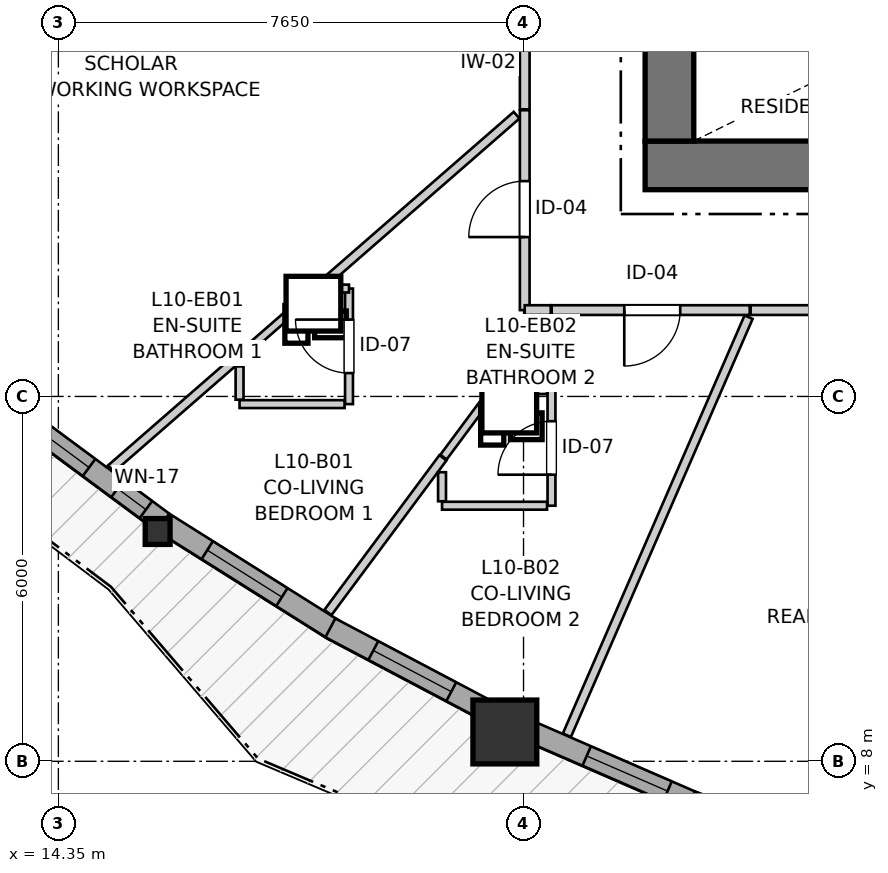
"""IFC4 building model, lengths in metres.
Left out: names, types, materials, properties, quantities, classifications, styles, units other than length and angle.
Written with IfcOpenShell. Run it as: python <this file> out.ifc"""

import sys

from ifc_helpers import new_model, si_unit, direction, frame, frame_2d, origin, origin_2d, place, context, subcontext, project, spatial, rectangle, i_section, extrude, source, transform, mapped, element, fill, save


model = new_model("IFC4")
c1 = context("Model", 3, precision=1e-05, world=origin(), true_north=direction((0.0, 1.0)))
c2 = subcontext(c1, "Body", "Model", "MODEL_VIEW")
j1 = project(units=[si_unit("LENGTHUNIT", "METRE"), si_unit("PLANEANGLEUNIT", "RADIAN")], contexts=[c1])
p1 = place(None, origin())
s1 = spatial("IfcSite", under=j1, at=p1, CompositionType="ELEMENT")
p2 = place(p1, origin())
s2 = spatial("IfcBuilding", under=s1, at=p2, CompositionType="ELEMENT")
p3 = place(p2, frame((0.0, 0.0, 36.6)))
s3 = spatial("IfcBuildingStorey", under=s2, at=p3, CompositionType="ELEMENT", Elevation=36.6)
p4 = place(p3, frame((24.0, 17.8, 0.0), z_axis=(0.0, 0.0, 1.0), x_axis=(1.0, 0.0, 0.0)))
e1 = element("IfcWall", 1, at=p4, inside=s3, PredefinedType="SHEAR", context=c2, shape_type="SweptSolid", body=[
    extrude(rectangle(XDim=12.7, YDim=0.8, at=frame_2d((6.35, 0.0))), origin(), (0.0, 0.0, 1.0), 2.94),
])
p5 = place(p3, frame((24.4, 33.8, 0.0), z_axis=(0.0, 0.0, 1.0), x_axis=(0.0, -1.0, 0.0)))
e2 = element("IfcWall", 2, at=p5, inside=s3, PredefinedType="SHEAR", context=c2, shape_type="SweptSolid", body=[
    extrude(rectangle(XDim=15.6, YDim=0.8, at=frame_2d((7.8, 0.0))), origin(), (0.0, 0.0, 1.0), 2.94),
])
p6 = place(p5, frame((7.05, 0.0, 0.0)))
e3 = element("IfcOpeningElement", 3, at=p6, cuts=e2, PredefinedType="OPENING", context=c2, shape_type="SweptSolid", body=[
    extrude(rectangle(XDim=1.5, YDim=2.15, at=frame_2d((0.75, 1.075))), frame((0.0, 0.41, 0.0), z_axis=(0.0, -1.0, 0.0), x_axis=(1.0, 0.0, 0.0)), (0.0, 0.0, 1.0), 0.82),
])
p7 = place(p5, frame((3.52, 0.0, 0.0)))
e4 = element("IfcOpeningElement", 4, at=p7, cuts=e2, PredefinedType="OPENING", context=c2, shape_type="SweptSolid", body=[
    extrude(rectangle(XDim=0.86, YDim=2.05, at=frame_2d((0.43, 1.025))), frame((0.0, 0.41, 0.0), z_axis=(0.0, -1.0, 0.0), x_axis=(1.0, 0.0, 0.0)), (0.0, 0.0, 1.0), 0.82),
])
p8 = place(p5, frame((11.22, 0.0, 0.0)))
e5 = element("IfcOpeningElement", 5, at=p8, cuts=e2, PredefinedType="OPENING", context=c2, shape_type="SweptSolid", body=[
    extrude(rectangle(XDim=0.86, YDim=2.05, at=frame_2d((0.43, 1.025))), frame((0.0, 0.41, 0.0), z_axis=(0.0, -1.0, 0.0), x_axis=(1.0, 0.0, 0.0)), (0.0, 0.0, 1.0), 0.82),
])
m1 = source(origin(), c2, "Body", "SweptSolid", [
    extrude(i_section(OverallWidth=0.409, OverallDepth=0.425, WebThickness=0.03, FlangeThickness=0.048, FilletRadius=0.015, at=origin_2d()), origin(), (0.0, 0.0, 1.0), 2.94),
])
p9 = place(p3, frame((15.983, 11.779, 0.0), z_axis=(0.0, 0.0, 1.0), x_axis=(1.0, 0.0, 0.0)))
e6 = element("IfcColumn", 6, at=p9, inside=s3, PredefinedType="PILASTER", context=c2, shape_type="MappedRepresentation", body=[
    mapped(m1, transform((0.0, 0.0, 0.0), x_axis=(1.0, 0.0, 0.0), y_axis=(0.0, 1.0, 0.0), z_axis=(0.0, 0.0, 1.0), scale=1.0)),
])
m2 = source(origin(), c2, "Body", "SweptSolid", [
    extrude(rectangle(XDim=1.05, YDim=1.05, at=origin_2d()), origin(), (0.0, 0.0, 1.0), 2.94),
])
p10 = place(p3, frame((21.693, 8.482, 0.0), z_axis=(0.0, 0.0, 1.0), x_axis=(1.0, 0.0, 0.0)))
e7 = element("IfcColumn", 7, at=p10, inside=s3, PredefinedType="COLUMN", context=c2, shape_type="MappedRepresentation", body=[
    mapped(m2, transform((0.0, 0.0, 0.0), x_axis=(1.0, 0.0, 0.0), y_axis=(0.0, 1.0, 0.0), z_axis=(0.0, 0.0, 1.0), scale=1.0)),
])
p11 = place(p3, frame((13.389, 13.917, 0.0), z_axis=(0.0, 0.0, 1.0), x_axis=(0.803777512245, -0.594930004966, 0.0)))
e8 = element("IfcWall", 8, at=p11, inside=s3, PredefinedType="SOLIDWALL", context=c2, shape_type="SweptSolid", body=[
    extrude(rectangle(XDim=3.336, YDim=0.35, at=frame_2d((1.668, 0.0))), origin(), (0.0, 0.0, 1.0), 2.42),
])
p12 = place(p11, frame((0.374, 0.0, 0.82)))
e9 = element("IfcOpeningElement", 9, at=p12, cuts=e8, PredefinedType="OPENING", context=c2, shape_type="SweptSolid", body=[
    extrude(rectangle(XDim=1.45, YDim=1.25, at=frame_2d((0.725, 0.625))), frame((0.0, 0.185, 0.0), z_axis=(0.0, -1.0, 0.0), x_axis=(1.0, 0.0, 0.0)), (0.0, 0.0, 1.0), 0.37),
])
p13 = place(p11, frame((2.407, 0.0, 0.82)))
e10 = element("IfcOpeningElement", 10, at=p13, cuts=e8, PredefinedType="OPENING", context=c2, shape_type="SweptSolid", body=[
    extrude(rectangle(XDim=0.58, YDim=1.35, at=frame_2d((0.29, 0.675))), frame((0.0, 0.185, 0.0), z_axis=(0.0, -1.0, 0.0), x_axis=(1.0, 0.0, 0.0)), (0.0, 0.0, 1.0), 0.37),
])
p14 = place(p3, frame((16.093, 11.917, 0.0), z_axis=(0.0, 0.0, 1.0), x_axis=(0.846444167315, -0.532477484612, 0.0)))
e11 = element("IfcWall", 11, at=p14, inside=s3, PredefinedType="SOLIDWALL", context=c2, shape_type="SweptSolid", body=[
    extrude(rectangle(XDim=3.317, YDim=0.35, at=frame_2d((1.659, 0.0))), origin(), (0.0, 0.0, 1.0), 2.42),
])
p15 = place(p14, frame((0.834, 0.0, 0.82)))
e12 = element("IfcOpeningElement", 12, at=p15, cuts=e11, PredefinedType="OPENING", context=c2, shape_type="SweptSolid", body=[
    extrude(rectangle(XDim=1.45, YDim=1.25, at=frame_2d((0.725, 0.625))), frame((0.0, 0.185, 0.0), z_axis=(0.0, -1.0, 0.0), x_axis=(1.0, 0.0, 0.0)), (0.0, 0.0, 1.0), 0.37),
])
p16 = place(p3, frame((18.823, 10.195, 0.0), z_axis=(0.0, 0.0, 1.0), x_axis=(0.884422538795, -0.466687018108, 0.0)))
e13 = element("IfcWall", 13, at=p16, inside=s3, PredefinedType="SOLIDWALL", context=c2, shape_type="SweptSolid", body=[
    extrude(rectangle(XDim=3.037, YDim=0.35, at=frame_2d((1.519, 0.0))), origin(), (0.0, 0.0, 1.0), 2.42),
])
p17 = place(p16, frame((0.799, 0.0, 0.82)))
e14 = element("IfcOpeningElement", 14, at=p17, cuts=e13, PredefinedType="OPENING", context=c2, shape_type="SweptSolid", body=[
    extrude(rectangle(XDim=1.45, YDim=1.25, at=frame_2d((0.725, 0.625))), frame((0.0, 0.185, 0.0), z_axis=(0.0, -1.0, 0.0), x_axis=(1.0, 0.0, 0.0)), (0.0, 0.0, 1.0), 0.37),
])
p18 = place(p3, frame((22.038, 8.523, 0.0), z_axis=(0.0, 0.0, 1.0), x_axis=(0.91704973522, -0.398772846535, 0.0)))
e15 = element("IfcWall", 15, at=p18, inside=s3, PredefinedType="SOLIDWALL", context=c2, shape_type="SweptSolid", body=[
    extrude(rectangle(XDim=3.056, YDim=0.35, at=frame_2d((1.528, 0.0))), origin(), (0.0, 0.0, 1.0), 2.42),
])
p19 = place(p18, frame((1.092, 0.0, 0.82)))
e16 = element("IfcOpeningElement", 16, at=p19, cuts=e15, PredefinedType="OPENING", context=c2, shape_type="SweptSolid", body=[
    extrude(rectangle(XDim=1.45, YDim=1.25, at=frame_2d((0.725, 0.625))), frame((0.0, 0.185, 0.0), z_axis=(0.0, -1.0, 0.0), x_axis=(1.0, 0.0, 0.0)), (0.0, 0.0, 1.0), 0.37),
])
p20 = place(p3, frame((24.758, 7.337, 0.0), z_axis=(0.0, 0.0, 1.0), x_axis=(0.944146789085, -0.329525174547, 0.0)))
e17 = element("IfcWall", 17, at=p20, inside=s3, PredefinedType="SOLIDWALL", context=c2, shape_type="SweptSolid", body=[
    extrude(rectangle(XDim=3.374, YDim=0.35, at=frame_2d((1.687, 0.0))), origin(), (0.0, 0.0, 1.0), 2.42),
])
p21 = place(p20, frame((0.647, 0.0, 0.82)))
e18 = element("IfcOpeningElement", 18, at=p21, cuts=e17, PredefinedType="OPENING", context=c2, shape_type="SweptSolid", body=[
    extrude(rectangle(XDim=2.1, YDim=1.4, at=frame_2d((1.05, 0.7))), frame((0.0, 0.185, 0.0), z_axis=(0.0, -1.0, 0.0), x_axis=(1.0, 0.0, 0.0)), (0.0, 0.0, 1.0), 0.37),
])
p22 = place(p3, frame((22.02, 18.722, 0.0), z_axis=(0.0, 0.0, 1.0), x_axis=(0.0, 1.0, 0.0)))
e19 = element("IfcWall", 19, at=p22, inside=s3, PredefinedType="PARTITIONING", context=c2, shape_type="SweptSolid", body=[
    extrude(rectangle(XDim=5.428, YDim=0.16, at=frame_2d((2.714, 0.0))), origin(), (0.0, 0.0, 1.0), 2.94),
])
p23 = place(p22, frame((1.996, 0.0, 0.0)))
e20 = element("IfcOpeningElement", 20, at=p23, cuts=e19, PredefinedType="OPENING", context=c2, shape_type="SweptSolid", body=[
    extrude(rectangle(XDim=0.96, YDim=2.1, at=frame_2d((0.48, 1.05))), frame((0.0, 0.09, 0.0), z_axis=(0.0, -1.0, 0.0), x_axis=(1.0, 0.0, 0.0)), (0.0, 0.0, 1.0), 0.18),
])
p24 = place(p3, frame((30.849, 15.42, 0.0), z_axis=(0.0, 0.0, 1.0), x_axis=(-1.0, 0.0, 0.0)))
e21 = element("IfcWall", 21, at=p24, inside=s3, PredefinedType="PARTITIONING", context=c2, shape_type="SweptSolid", body=[
    extrude(rectangle(XDim=5.114, YDim=0.16, at=frame_2d((2.557, 0.0))), origin(), (0.0, 0.0, 1.0), 2.94),
])
p25 = place(p24, frame((2.076, 0.0, 0.0)))
e22 = element("IfcOpeningElement", 22, at=p25, cuts=e21, PredefinedType="OPENING", context=c2, shape_type="SweptSolid", body=[
    extrude(rectangle(XDim=0.96, YDim=2.1, at=frame_2d((0.48, 1.05))), frame((0.0, 0.09, 0.0), z_axis=(0.0, -1.0, 0.0), x_axis=(1.0, 0.0, 0.0)), (0.0, 0.0, 1.0), 0.18),
])
p26 = place(p3, frame((22.02, 15.42, 0.0), z_axis=(0.0, 0.0, 1.0), x_axis=(0.0, 1.0, 0.0)))
e23 = element("IfcWall", 23, at=p26, inside=s3, PredefinedType="PARTITIONING", context=c2, shape_type="SweptSolid", body=[
    extrude(rectangle(XDim=3.287, YDim=0.16, at=frame_2d((1.644, 0.0))), origin(), (0.0, 0.0, 1.0), 2.94),
])
p27 = place(p26, frame((1.201, 0.0, 0.0)))
e24 = element("IfcOpeningElement", 24, at=p27, cuts=e23, PredefinedType="OPENING", context=c2, shape_type="SweptSolid", body=[
    extrude(rectangle(XDim=0.92, YDim=2.1, at=frame_2d((0.46, 1.05))), frame((0.0, 0.09, 0.0), z_axis=(0.0, -1.0, 0.0), x_axis=(1.0, 0.0, 0.0)), (0.0, 0.0, 1.0), 0.18),
])
p28 = place(p3, frame((25.72, 15.42, 0.0), z_axis=(0.0, 0.0, 1.0), x_axis=(-1.0, 0.0, 0.0)))
e25 = element("IfcWall", 25, at=p28, inside=s3, PredefinedType="PARTITIONING", context=c2, shape_type="SweptSolid", body=[
    extrude(rectangle(XDim=3.257, YDim=0.16, at=frame_2d((1.628, 0.0))), origin(), (0.0, 0.0, 1.0), 2.94),
])
p29 = place(p28, frame((1.143, 0.0, 0.0)))
e26 = element("IfcOpeningElement", 26, at=p29, cuts=e25, PredefinedType="OPENING", context=c2, shape_type="SweptSolid", body=[
    extrude(rectangle(XDim=0.92, YDim=2.1, at=frame_2d((0.46, 1.05))), frame((0.0, 0.09, 0.0), z_axis=(0.0, -1.0, 0.0), x_axis=(1.0, 0.0, 0.0)), (0.0, 0.0, 1.0), 0.18),
])
p30 = place(p3, frame((22.46, 12.203, 0.0), z_axis=(0.0, 0.0, 1.0), x_axis=(0.0, 1.0, 0.0)))
e27 = element("IfcWall", 27, at=p30, inside=s3, PredefinedType="PARTITIONING", context=c2, shape_type="SweptSolid", body=[
    extrude(rectangle(XDim=1.9, YDim=0.13, at=frame_2d((0.95, 0.0))), origin(), (0.0, 0.0, 1.0), 2.94),
])
p31 = place(p30, frame((0.51, 0.0, 0.0)))
e28 = element("IfcOpeningElement", 28, at=p31, cuts=e27, PredefinedType="OPENING", context=c2, shape_type="SweptSolid", body=[
    extrude(rectangle(XDim=0.88, YDim=2.05, at=frame_2d((0.44, 1.025))), frame((0.0, 0.075, 0.0), z_axis=(0.0, -1.0, 0.0), x_axis=(1.0, 0.0, 0.0)), (0.0, 0.0, 1.0), 0.15),
])
p32 = place(p3, frame((19.13, 13.874, 0.0), z_axis=(0.0, 0.0, 1.0), x_axis=(0.0, 1.0, 0.0)))
e29 = element("IfcWall", 29, at=p32, inside=s3, PredefinedType="PARTITIONING", context=c2, shape_type="SweptSolid", body=[
    extrude(rectangle(XDim=1.9, YDim=0.13, at=frame_2d((0.95, 0.0))), origin(), (0.0, 0.0, 1.0), 2.94),
])
p33 = place(p32, frame((0.51, 0.0, 0.0)))
e30 = element("IfcOpeningElement", 30, at=p33, cuts=e29, PredefinedType="OPENING", context=c2, shape_type="SweptSolid", body=[
    extrude(rectangle(XDim=0.88, YDim=2.05, at=frame_2d((0.44, 1.025))), frame((0.0, 0.075, 0.0), z_axis=(0.0, -1.0, 0.0), x_axis=(1.0, 0.0, 0.0)), (0.0, 0.0, 1.0), 0.15),
])
p34 = place(p3, frame((22.713, 8.429, 0.0), z_axis=(0.0, 0.0, 1.0), x_axis=(0.398615352261, 0.917118204454, 0.0)))
e31 = element("IfcWall", 31, at=p34, inside=s3, PredefinedType="PARTITIONING", context=c2, shape_type="SweptSolid", body=[
    extrude(rectangle(XDim=7.496, YDim=0.145, at=frame_2d((3.748, 0.0))), origin(), (0.0, 0.0, 1.0), 2.94),
])
p35 = place(p3, frame((18.614, 15.774, 0.0), z_axis=(0.0, 0.0, 1.0), x_axis=(0.753902736672, 0.656986045239, 0.0)))
e32 = element("IfcWall", 32, at=p35, inside=s3, PredefinedType="PARTITIONING", context=c2, shape_type="SweptSolid", body=[
    extrude(rectangle(XDim=4.34, YDim=0.145, at=frame_2d((2.17, 0.0))), origin(), (0.0, 0.0, 1.0), 2.94),
])
p36 = place(p3, frame((18.783, 10.447, 0.0), z_axis=(0.0, 0.0, 1.0), x_axis=(0.596791765516, 0.80239615441, 0.0)))
e33 = element("IfcWall", 33, at=p36, inside=s3, PredefinedType="PARTITIONING", context=c2, shape_type="SweptSolid", body=[
    extrude(rectangle(XDim=3.17, YDim=0.145, at=frame_2d((1.585, 0.0))), origin(), (0.0, 0.0, 1.0), 2.94),
])
p37 = place(p3, frame((15.215, 12.812, 0.0), z_axis=(0.0, 0.0, 1.0), x_axis=(0.753874404049, 0.657018555993, 0.0)))
e34 = element("IfcWall", 34, at=p37, inside=s3, PredefinedType="PARTITIONING", context=c2, shape_type="SweptSolid", body=[
    extrude(rectangle(XDim=2.805, YDim=0.145, at=frame_2d((1.403, 0.0))), origin(), (0.0, 0.0, 1.0), 2.94),
])
p38 = place(p3, frame((17.33, 13.874, 0.0), z_axis=(0.0, 0.0, 1.0), x_axis=(1.0, 0.0, 0.0)))
e35 = element("IfcWall", 35, at=p38, inside=s3, PredefinedType="PARTITIONING", context=c2, shape_type="SweptSolid", body=[
    extrude(rectangle(XDim=1.727, YDim=0.13, at=frame_2d((0.863, 0.0))), origin(), (0.0, 0.0, 1.0), 2.94),
])
p39 = place(p3, frame((20.66, 12.203, 0.0), z_axis=(0.0, 0.0, 1.0), x_axis=(1.0, 0.0, 0.0)))
e36 = element("IfcWall", 36, at=p39, inside=s3, PredefinedType="PARTITIONING", context=c2, shape_type="SweptSolid", body=[
    extrude(rectangle(XDim=1.727, YDim=0.13, at=frame_2d((0.864, 0.0))), origin(), (0.0, 0.0, 1.0), 2.94),
])
p40 = place(p3, frame((17.341, 14.665, 0.0), z_axis=(0.0, 0.0, 1.0), x_axis=(0.753885757535, 0.657005528581, 0.0)))
e37 = element("IfcWall", 37, at=p40, inside=s3, PredefinedType="PARTITIONING", context=c2, shape_type="SweptSolid", body=[
    extrude(rectangle(XDim=1.673, YDim=0.13, at=frame_2d((0.837, 0.0))), origin(), (0.0, 0.0, 1.0), 2.94),
])
p41 = place(p3, frame((21.491, 14.088, 0.0), z_axis=(0.0, 0.0, 1.0), x_axis=(0.596893728005, 0.802320308523, 0.0)))
e38 = element("IfcWall", 38, at=p41, inside=s3, PredefinedType="PARTITIONING", context=c2, shape_type="SweptSolid", body=[
    extrude(rectangle(XDim=1.499, YDim=0.145, at=frame_2d((0.749, 0.0))), origin(), (0.0, 0.0, 1.0), 2.94),
])
p42 = place(p3, frame((20.684, 13.003, 0.0), z_axis=(0.0, 0.0, 1.0), x_axis=(0.596518903615, 0.802599026681, 0.0)))
e39 = element("IfcWall", 39, at=p42, inside=s3, PredefinedType="PARTITIONING", context=c2, shape_type="SweptSolid", body=[
    extrude(rectangle(XDim=1.337, YDim=0.13, at=frame_2d((0.669, 0.0))), origin(), (0.0, 0.0, 1.0), 2.94),
])
p43 = place(p3, frame((21.649, 14.103, 0.0), z_axis=(0.0, 0.0, 1.0), x_axis=(1.0, 0.0, 0.0)))
e40 = element("IfcWall", 40, at=p43, inside=s3, PredefinedType="PARTITIONING", context=c2, shape_type="SweptSolid", body=[
    extrude(rectangle(XDim=0.738, YDim=0.13, at=frame_2d((0.369, 0.0))), origin(), (0.0, 0.0, 1.0), 2.94),
])
p44 = place(p3, frame((17.33, 13.947, 0.0), z_axis=(0.0, 0.0, 1.0), x_axis=(0.0, 1.0, 0.0)))
e41 = element("IfcWall", 41, at=p44, inside=s3, PredefinedType="PARTITIONING", context=c2, shape_type="SweptSolid", body=[
    extrude(rectangle(XDim=0.547, YDim=0.13, at=frame_2d((0.273, 0.0))), origin(), (0.0, 0.0, 1.0), 2.94),
])
p45 = place(p3, frame((20.66, 12.276, 0.0), z_axis=(0.0, 0.0, 1.0), x_axis=(0.0, 1.0, 0.0)))
e42 = element("IfcWall", 42, at=p45, inside=s3, PredefinedType="PARTITIONING", context=c2, shape_type="SweptSolid", body=[
    extrude(rectangle(XDim=0.478, YDim=0.13, at=frame_2d((0.239, 0.0))), origin(), (0.0, 0.0, 1.0), 2.94),
])
p46 = place(p3, frame((18.749, 15.774, 0.0), z_axis=(0.0, 0.0, 1.0), x_axis=(1.0, 0.0, 0.0)))
e43 = element("IfcWall", 43, at=p46, inside=s3, PredefinedType="PARTITIONING", context=c2, shape_type="SweptSolid", body=[
    extrude(rectangle(XDim=0.381, YDim=0.13, at=frame_2d((0.19, 0.0))), origin(), (0.0, 0.0, 1.0), 2.94),
])
p47 = place(p3, frame((22.02, 15.42, 0.0), z_axis=(0.0, 0.0, 1.0), x_axis=(1.0, 0.0, 0.0)))
e44 = element("IfcWall", 44, at=p47, inside=s3, PredefinedType="PARTITIONING", context=c2, shape_type="SweptSolid", body=[
    extrude(rectangle(XDim=0.428, YDim=0.16, at=frame_2d((0.214, 0.0))), origin(), (0.0, 0.0, 1.0), 2.94),
])
m3 = source(origin(), c2, "Body", "SweptSolid", [
    extrude(rectangle(XDim=1.45, YDim=1.25, at=frame_2d((0.725, 0.625))), frame((0.0, 0.03, 0.0), z_axis=(0.0, -1.0, 0.0), x_axis=(1.0, 0.0, 0.0)), (0.0, 0.0, 1.0), 0.06),
])
p48 = place(p12, origin())
e45 = element("IfcWindow", 45, at=p48, inside=s3, PartitioningType="SINGLE_PANEL", PredefinedType="WINDOW", context=c2, shape_type="MappedRepresentation", body=[
    mapped(m3, transform((0.0, 0.0, 0.0), x_axis=(1.0, 0.0, 0.0), y_axis=(0.0, 1.0, 0.0), z_axis=(0.0, 0.0, 1.0), scale=1.0)),
])
fill(e9, e45)
m4 = source(origin(), c2, "Body", "SweptSolid", [
    extrude(rectangle(XDim=0.58, YDim=1.35, at=frame_2d((0.29, 0.675))), frame((0.0, 0.03, 0.0), z_axis=(0.0, -1.0, 0.0), x_axis=(1.0, 0.0, 0.0)), (0.0, 0.0, 1.0), 0.06),
])
p49 = place(p13, origin())
e46 = element("IfcWindow", 46, at=p49, inside=s3, PartitioningType="SINGLE_PANEL", PredefinedType="WINDOW", context=c2, shape_type="MappedRepresentation", body=[
    mapped(m4, transform((0.0, 0.0, 0.0), x_axis=(1.0, 0.0, 0.0), y_axis=(0.0, 1.0, 0.0), z_axis=(0.0, 0.0, 1.0), scale=1.0)),
])
fill(e10, e46)
p50 = place(p15, origin())
e47 = element("IfcWindow", 47, at=p50, inside=s3, PartitioningType="SINGLE_PANEL", PredefinedType="WINDOW", context=c2, shape_type="MappedRepresentation", body=[
    mapped(m3, transform((0.0, 0.0, 0.0), x_axis=(1.0, 0.0, 0.0), y_axis=(0.0, 1.0, 0.0), z_axis=(0.0, 0.0, 1.0), scale=1.0)),
])
fill(e12, e47)
p51 = place(p17, origin())
e48 = element("IfcWindow", 48, at=p51, inside=s3, PartitioningType="SINGLE_PANEL", PredefinedType="WINDOW", context=c2, shape_type="MappedRepresentation", body=[
    mapped(m3, transform((0.0, 0.0, 0.0), x_axis=(1.0, 0.0, 0.0), y_axis=(0.0, 1.0, 0.0), z_axis=(0.0, 0.0, 1.0), scale=1.0)),
])
fill(e14, e48)
p52 = place(p19, origin())
e49 = element("IfcWindow", 49, at=p52, inside=s3, PartitioningType="SINGLE_PANEL", PredefinedType="WINDOW", context=c2, shape_type="MappedRepresentation", body=[
    mapped(m3, transform((0.0, 0.0, 0.0), x_axis=(1.0, 0.0, 0.0), y_axis=(0.0, 1.0, 0.0), z_axis=(0.0, 0.0, 1.0), scale=1.0)),
])
fill(e16, e49)
m5 = source(origin(), c2, "Body", "SweptSolid", [
    extrude(rectangle(XDim=0.92, YDim=2.1, at=frame_2d((0.46, 1.05))), frame((0.0, 0.025, 0.0), z_axis=(0.0, -1.0, 0.0), x_axis=(1.0, 0.0, 0.0)), (0.0, 0.0, 1.0), 0.05),
])
p53 = place(p27, origin())
e50 = element("IfcDoor", 50, at=p53, inside=s3, OperationType="SINGLE_SWING_LEFT", PredefinedType="DOOR", context=c2, shape_type="MappedRepresentation", body=[
    mapped(m5, transform((0.0, 0.0, 0.0), x_axis=(1.0, 0.0, 0.0), y_axis=(0.0, 1.0, 0.0), z_axis=(0.0, 0.0, 1.0), scale=1.0)),
])
fill(e24, e50)
p54 = place(p29, origin())
e51 = element("IfcDoor", 51, at=p54, inside=s3, OperationType="SINGLE_SWING_RIGHT", PredefinedType="DOOR", context=c2, shape_type="MappedRepresentation", body=[
    mapped(m5, transform((0.0, 0.0, 0.0), x_axis=(1.0, 0.0, 0.0), y_axis=(0.0, 1.0, 0.0), z_axis=(0.0, 0.0, 1.0), scale=1.0)),
])
fill(e26, e51)
m6 = source(origin(), c2, "Body", "SweptSolid", [
    extrude(rectangle(XDim=0.88, YDim=2.05, at=frame_2d((0.44, 1.025))), frame((0.0, 0.025, 0.0), z_axis=(0.0, -1.0, 0.0), x_axis=(1.0, 0.0, 0.0)), (0.0, 0.0, 1.0), 0.05),
])
p55 = place(p31, origin())
e52 = element("IfcDoor", 52, at=p55, inside=s3, OperationType="SINGLE_SWING_LEFT", PredefinedType="DOOR", context=c2, shape_type="MappedRepresentation", body=[
    mapped(m6, transform((0.0, 0.0, 0.0), x_axis=(1.0, 0.0, 0.0), y_axis=(0.0, 1.0, 0.0), z_axis=(0.0, 0.0, 1.0), scale=1.0)),
])
fill(e28, e52)
p56 = place(p33, origin())
e53 = element("IfcDoor", 53, at=p56, inside=s3, OperationType="SINGLE_SWING_RIGHT", PredefinedType="DOOR", context=c2, shape_type="MappedRepresentation", body=[
    mapped(m6, transform((0.0, 0.0, 0.0), x_axis=(1.0, 0.0, 0.0), y_axis=(0.0, 1.0, 0.0), z_axis=(0.0, 0.0, 1.0), scale=1.0)),
])
fill(e30, e53)
save(model, sys.argv[1])
